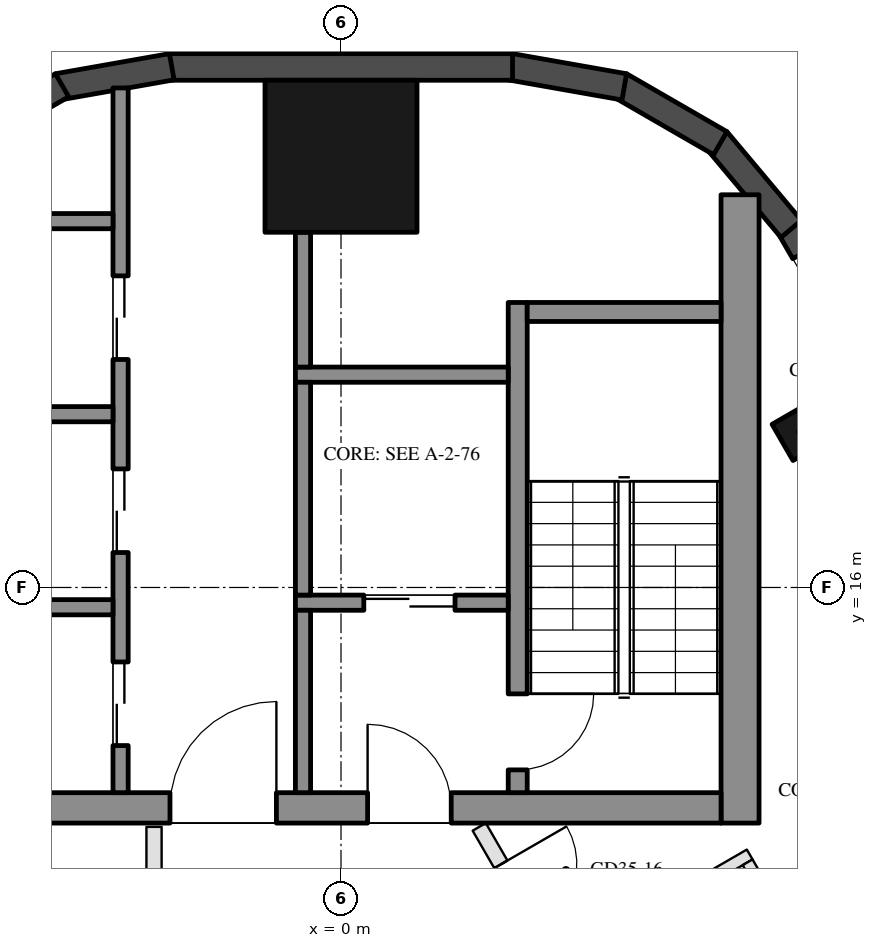
"""IFC4 building model, lengths in metres.
Left out: names, types, materials, properties, quantities, classifications, styles, units other than length and angle.
Written with IfcOpenShell. Run it as: python <this file> out.ifc"""

import sys

from ifc_helpers import new_model, si_unit, direction, frame, frame_2d, origin, origin_2d, place, context, subcontext, project, spatial, rectangle, hollow_rectangle, extrude, boolean, halfspace, element, fill, save


model = new_model("IFC4")
c1 = context("Model", 3, precision=1e-05, world=origin(), true_north=direction((0.0, 1.0)))
c2 = subcontext(c1, "Body", "Model", "MODEL_VIEW")
j1 = project(units=[si_unit("LENGTHUNIT", "METRE"), si_unit("PLANEANGLEUNIT", "RADIAN")], contexts=[c1])
p1 = place(None, origin())
s1 = spatial("IfcSite", under=j1, at=p1, CompositionType="ELEMENT")
p2 = place(p1, origin())
s2 = spatial("IfcBuilding", under=s1, at=p2, CompositionType="ELEMENT")
p3 = place(p2, frame((0.0, 0.0, 324.4)))
s3 = spatial("IfcBuildingStorey", under=s2, at=p3, CompositionType="ELEMENT", Elevation=324.4)
p4 = place(p3, frame((6.047, 18.046, 0.0), z_axis=(0.0, 0.0, 1.0), x_axis=(-0.5, 0.866025403784, 0.0)))
e1 = element("IfcColumn", 1, at=p4, inside=s3, PredefinedType="COLUMN", context=c2, shape_type="SweptSolid", body=[
    boolean("DIFFERENCE", boolean("DIFFERENCE", extrude(hollow_rectangle(XDim=0.55, YDim=0.55, WallThickness=0.025, at=origin_2d()), origin(), (0.0, 0.0, 1.0), 3.7), halfspace(frame((0.0, 0.0, 0.04), z_axis=(0.0, 0.0, 1.0), x_axis=(1.0, 0.0, 0.0)), True)), halfspace(frame((0.0, 0.0, 3.66), z_axis=(0.0, 0.0, 1.0), x_axis=(1.0, 0.0, 0.0)), False)),
])
p5 = place(p3, frame((0.0, 21.674, 0.0), z_axis=(0.0, 0.0, 1.0), x_axis=(1.0, 0.0, 0.0)))
e2 = element("IfcColumn", 2, at=p5, inside=s3, PredefinedType="COLUMN", context=c2, shape_type="SweptSolid", body=[
    boolean("DIFFERENCE", boolean("DIFFERENCE", extrude(hollow_rectangle(XDim=2.0, YDim=2.0, WallThickness=0.05, at=origin_2d()), origin(), (0.0, 0.0, 1.0), 3.7), halfspace(frame((0.0, 0.0, 0.113), z_axis=(0.0, 0.0, 1.0), x_axis=(1.0, 0.0, 0.0)), True)), halfspace(frame((0.0, 0.0, 3.587), z_axis=(0.0, 0.0, 1.0), x_axis=(1.0, 0.0, 0.0)), False)),
])
p6 = place(p3, frame((7.558, 17.879, 0.0), z_axis=(0.0, 0.0, 1.0), x_axis=(-0.499967508769, 0.866044161793, 0.0)))
e3 = element("IfcWall", 3, at=p6, inside=s3, PredefinedType="SOLIDWALL", context=c2, shape_type="SweptSolid", body=[
    extrude(rectangle(XDim=3.306, YDim=0.35, at=frame_2d((1.653, 0.0))), origin(), (0.0, 0.0, 1.0), 3.55),
])
p7 = place(p6, frame((1.525, 0.0, 0.3)))
e4 = element("IfcOpeningElement", 4, at=p7, cuts=e3, PredefinedType="OPENING", context=c2, shape_type="SweptSolid", body=[
    extrude(rectangle(XDim=1.4, YDim=2.65, at=frame_2d((0.7, 1.325))), frame((0.0, 0.185, 0.0), z_axis=(0.0, -1.0, 0.0), x_axis=(1.0, 0.0, 0.0)), (0.0, 0.0, 1.0), 0.37),
])
for number, where, z_axis, x_axis in (
    (5, (5.923, 20.718, 0.0), (0.0, 0.0, 1.0), (-0.643, 0.766, 0.0)),
    (6, (4.99, 21.846, 0.0), (0.0, 0.0, 1.0), (-0.866, 0.5, 0.0)),
):
    element("IfcWall", number, at=place(p3, frame(where, z_axis=z_axis, x_axis=x_axis)), inside=s3, PredefinedType="SOLIDWALL", context=c2, shape_type="SweptSolid", body=[
        extrude(rectangle(XDim=1.524, YDim=0.35, at=frame_2d((0.762, 0.0))), origin(), (0.0, 0.0, 1.0), 3.55),
    ])
p8 = place(p3, frame((3.727, 22.587, 0.0), z_axis=(0.0, 0.0, 1.0), x_axis=(-0.984804518596, 0.173666519954, 0.0)))
e7 = element("IfcWall", 7, at=p8, inside=s3, PredefinedType="SOLIDWALL", context=c2, shape_type="SweptSolid", body=[
    extrude(rectangle(XDim=1.524, YDim=0.35, at=frame_2d((0.762, 0.0))), origin(), (0.0, 0.0, 1.0), 3.55),
])
p9 = place(p3, frame((2.257, 22.849, 0.0), z_axis=(0.0, 0.0, 1.0), x_axis=(-1.0, 0.0, 0.0)))
e8 = element("IfcWall", 8, at=p9, inside=s3, PredefinedType="SOLIDWALL", context=c2, shape_type="SweptSolid", body=[
    extrude(rectangle(XDim=4.514, YDim=0.35, at=frame_2d((2.257, 0.0))), origin(), (0.0, 0.0, 1.0), 3.55),
])
p10 = place(p3, frame((-2.227, 22.852, 0.0), z_axis=(0.0, 0.0, 1.0), x_axis=(-0.984804518596, -0.173666519954, 0.0)))
e9 = element("IfcWall", 9, at=p10, inside=s3, PredefinedType="SOLIDWALL", context=c2, shape_type="SweptSolid", body=[
    extrude(rectangle(XDim=1.524, YDim=0.35, at=frame_2d((0.762, 0.0))), origin(), (0.0, 0.0, 1.0), 3.55),
])
p11 = place(p3, frame((-3.67, 22.608, 0.0), z_axis=(0.0, 0.0, 1.0), x_axis=(-0.865996139065, -0.500050684555, 0.0)))
e10 = element("IfcWall", 10, at=p11, inside=s3, PredefinedType="SOLIDWALL", context=c2, shape_type="SweptSolid", body=[
    extrude(rectangle(XDim=1.524, YDim=0.35, at=frame_2d((0.762, 0.0))), origin(), (0.0, 0.0, 1.0), 3.55),
])
p12 = place(p3, frame((5.25, 12.9, 0.0), z_axis=(0.0, 0.0, 1.0), x_axis=(0.0, 1.0, 0.0)))
e11 = element("IfcWall", 11, at=p12, inside=s3, PredefinedType="SHEAR", context=c2, shape_type="SweptSolid", body=[
    extrude(rectangle(XDim=8.267, YDim=0.5, at=frame_2d((4.134, 0.0))), origin(), (0.0, 0.0, 1.0), 3.5),
])
p13 = place(p3, frame((5.0, 13.1, 0.0), z_axis=(0.0, 0.0, 1.0), x_axis=(-1.0, 0.0, 0.0)))
e12 = element("IfcWall", 12, at=p13, inside=s3, PredefinedType="SHEAR", context=c2, shape_type="SweptSolid", body=[
    extrude(rectangle(XDim=10.0, YDim=0.4, at=frame_2d((5.0, 0.0))), origin(), (0.0, 0.0, 1.0), 3.5),
])
p14 = place(p13, frame((3.55, 0.0, 0.0)))
e13 = element("IfcOpeningElement", 13, at=p14, cuts=e12, PredefinedType="OPENING", context=c2, shape_type="SweptSolid", body=[
    extrude(rectangle(XDim=1.1, YDim=2.1, at=frame_2d((0.55, 1.05))), frame((0.0, 0.21, 0.0), z_axis=(0.0, -1.0, 0.0), x_axis=(1.0, 0.0, 0.0)), (0.0, 0.0, 1.0), 0.42),
])
p15 = place(p13, frame((5.85, 0.0, 0.0)))
e14 = element("IfcOpeningElement", 14, at=p15, cuts=e12, PredefinedType="OPENING", context=c2, shape_type="SweptSolid", body=[
    extrude(rectangle(XDim=1.4, YDim=2.1, at=frame_2d((0.7, 1.05))), frame((0.0, 0.21, 0.0), z_axis=(0.0, -1.0, 0.0), x_axis=(1.0, 0.0, 0.0)), (0.0, 0.0, 1.0), 0.42),
])
p16 = place(p3, frame((2.325, 13.3, 0.0), z_axis=(0.0, 0.0, 1.0), x_axis=(0.0, 1.0, 0.0)))
e15 = element("IfcWall", 15, at=p16, inside=s3, PredefinedType="SHEAR", context=c2, shape_type="SweptSolid", body=[
    extrude(rectangle(XDim=6.45, YDim=0.25, at=frame_2d((3.225, 0.0))), origin(), (0.0, 0.0, 1.0), 3.5),
])
p17 = place(p16, frame((0.3, 0.0, 0.0)))
e16 = element("IfcOpeningElement", 16, at=p17, cuts=e15, PredefinedType="OPENING", context=c2, shape_type="SweptSolid", body=[
    extrude(rectangle(XDim=1.0, YDim=2.1, at=frame_2d((0.5, 1.05))), frame((0.0, 0.135, 0.0), z_axis=(0.0, -1.0, 0.0), x_axis=(1.0, 0.0, 0.0)), (0.0, 0.0, 1.0), 0.27),
])
p18 = place(p3, frame((5.0, 19.625, 0.0), z_axis=(0.0, 0.0, 1.0), x_axis=(-1.0, 0.0, 0.0)))
e17 = element("IfcWall", 17, at=p18, inside=s3, PredefinedType="SHEAR", context=c2, shape_type="SweptSolid", body=[
    extrude(rectangle(XDim=2.55, YDim=0.25, at=frame_2d((1.275, 0.0))), origin(), (0.0, 0.0, 1.0), 3.5),
])
p19 = place(p3, frame((2.2, 18.8, 0.0), z_axis=(0.0, 0.0, 1.0), x_axis=(-1.0, 0.0, 0.0)))
e18 = element("IfcWall", 18, at=p19, inside=s3, PredefinedType="SHEAR", context=c2, shape_type="SweptSolid", body=[
    extrude(rectangle(XDim=2.8, YDim=0.2, at=frame_2d((1.4, 0.0))), origin(), (0.0, 0.0, 1.0), 3.5),
])
p20 = place(p3, frame((2.2, 15.8, 0.0), z_axis=(0.0, 0.0, 1.0), x_axis=(-1.0, 0.0, 0.0)))
e19 = element("IfcWall", 19, at=p20, inside=s3, PredefinedType="SHEAR", context=c2, shape_type="SweptSolid", body=[
    extrude(rectangle(XDim=2.8, YDim=0.2, at=frame_2d((1.4, 0.0))), origin(), (0.0, 0.0, 1.0), 3.5),
])
p21 = place(p20, frame((0.7, 0.0, 0.0)))
e20 = element("IfcOpeningElement", 20, at=p21, cuts=e19, PredefinedType="OPENING", context=c2, shape_type="SweptSolid", body=[
    extrude(rectangle(XDim=1.2, YDim=2.1, at=frame_2d((0.6, 1.05))), frame((0.0, 0.11, 0.0), z_axis=(0.0, -1.0, 0.0), x_axis=(1.0, 0.0, 0.0)), (0.0, 0.0, 1.0), 0.22),
])
p22 = place(p3, frame((-0.5, 15.9, 0.0), z_axis=(0.0, 0.0, 1.0), x_axis=(0.0, 1.0, 0.0)))
e21 = element("IfcWall", 21, at=p22, inside=s3, PredefinedType="SHEAR", context=c2, shape_type="SweptSolid", body=[
    extrude(rectangle(XDim=2.8, YDim=0.2, at=frame_2d((1.4, 0.0))), origin(), (0.0, 0.0, 1.0), 3.5),
])
p23 = place(p3, frame((-0.5, 13.3, 0.0), z_axis=(0.0, 0.0, 1.0), x_axis=(0.0, 1.0, 0.0)))
e22 = element("IfcWall", 22, at=p23, inside=s3, PredefinedType="SHEAR", context=c2, shape_type="SweptSolid", body=[
    extrude(rectangle(XDim=2.4, YDim=0.2, at=frame_2d((1.2, 0.0))), origin(), (0.0, 0.0, 1.0), 3.5),
])
p24 = place(p3, frame((-2.9, 13.3, 0.0), z_axis=(0.0, 0.0, 1.0), x_axis=(0.0, 1.0, 0.0)))
e23 = element("IfcWall", 23, at=p24, inside=s3, PredefinedType="SHEAR", context=c2, shape_type="SweptSolid", body=[
    extrude(rectangle(XDim=9.273, YDim=0.2, at=frame_2d((4.636, 0.0))), origin(), (0.0, 0.0, 1.0), 3.5),
])
p25 = place(p24, frame((0.62, 0.0, 0.0)))
e24 = element("IfcOpeningElement", 24, at=p25, cuts=e23, PredefinedType="OPENING", context=c2, shape_type="SweptSolid", body=[
    extrude(rectangle(XDim=1.1, YDim=2.1, at=frame_2d((0.55, 1.05))), frame((0.0, 0.11, 0.0), z_axis=(0.0, -1.0, 0.0), x_axis=(1.0, 0.0, 0.0)), (0.0, 0.0, 1.0), 0.22),
])
p26 = place(p24, frame((3.16, 0.0, 0.0)))
e25 = element("IfcOpeningElement", 25, at=p26, cuts=e23, PredefinedType="OPENING", context=c2, shape_type="SweptSolid", body=[
    extrude(rectangle(XDim=1.1, YDim=2.1, at=frame_2d((0.55, 1.05))), frame((0.0, 0.11, 0.0), z_axis=(0.0, -1.0, 0.0), x_axis=(1.0, 0.0, 0.0)), (0.0, 0.0, 1.0), 0.22),
])
p27 = place(p24, frame((5.7, 0.0, 0.0)))
e26 = element("IfcOpeningElement", 26, at=p27, cuts=e23, PredefinedType="OPENING", context=c2, shape_type="SweptSolid", body=[
    extrude(rectangle(XDim=1.1, YDim=2.1, at=frame_2d((0.55, 1.05))), frame((0.0, 0.11, 0.0), z_axis=(0.0, -1.0, 0.0), x_axis=(1.0, 0.0, 0.0)), (0.0, 0.0, 1.0), 0.22),
])
p28 = place(p3, frame((-0.5, 18.9, 0.0), z_axis=(0.0, 0.0, 1.0), x_axis=(0.0, 1.0, 0.0)))
e27 = element("IfcWall", 27, at=p28, inside=s3, PredefinedType="SHEAR", context=c2, shape_type="SweptSolid", body=[
    extrude(rectangle(XDim=1.774, YDim=0.2, at=frame_2d((0.887, 0.0))), origin(), (0.0, 0.0, 1.0), 3.5),
])
for number, where, z_axis, x_axis in (
    (28, (-3.0, 15.74, 0.0), (0.0, 0.0, 1.0), (-1.0, 0.0, 0.0)),
    (29, (-3.0, 18.28, 0.0), (0.0, 0.0, 1.0), (-1.0, 0.0, 0.0)),
    (30, (-3.0, 20.82, 0.0), (0.0, 0.0, 1.0), (-1.0, 0.0, 0.0)),
):
    element("IfcWall", number, at=place(p3, frame(where, z_axis=z_axis, x_axis=x_axis)), inside=s3, PredefinedType="SHEAR", context=c2, shape_type="SweptSolid", body=[
        extrude(rectangle(XDim=2.0, YDim=0.2, at=frame_2d((1.0, 0.0))), origin(), (0.0, 0.0, 1.0), 3.5),
    ])
p29 = place(p3, frame((8.979, 12.418, 0.0), z_axis=(0.0, 0.0, 1.0), x_axis=(-0.851645923852, -0.524117563516, 0.0)))
e31 = element("IfcWall", 31, at=p29, inside=s3, PredefinedType="PARTITIONING", context=c2, shape_type="SweptSolid", body=[
    extrude(rectangle(XDim=6.088, YDim=0.2, at=frame_2d((3.044, 0.0))), origin(), (0.0, 0.0, 1.0), 3.15),
])
p30 = place(p3, frame((1.819, 12.85, 0.0), z_axis=(0.0, 0.0, 1.0), x_axis=(0.499997437312, -0.866026883348, 0.0)))
e32 = element("IfcWall", 32, at=p30, inside=s3, PredefinedType="PARTITIONING", context=c2, shape_type="SweptSolid", body=[
    extrude(rectangle(XDim=4.022, YDim=0.2, at=frame_2d((2.011, 0.0))), origin(), (0.0, 0.0, 1.0), 3.15),
])
p31 = place(p30, frame((0.569, 0.0, 0.0)))
e33 = element("IfcOpeningElement", 33, at=p31, cuts=e32, PredefinedType="OPENING", context=c2, shape_type="SweptSolid", body=[
    extrude(rectangle(XDim=1.0, YDim=2.1, at=frame_2d((0.5, 1.05))), frame((0.0, 0.11, 0.0), z_axis=(0.0, -1.0, 0.0), x_axis=(1.0, 0.0, 0.0)), (0.0, 0.0, 1.0), 0.22),
])
p32 = place(p3, frame((5.377, 12.487, 0.0), z_axis=(0.0, 0.0, 1.0), x_axis=(-0.865996816683, -0.500049511043, 0.0)))
e34 = element("IfcWall", 34, at=p32, inside=s3, PredefinedType="PARTITIONING", context=c2, shape_type="SweptSolid", body=[
    extrude(rectangle(XDim=2.8, YDim=0.15, at=frame_2d((1.4, 0.0))), origin(), (0.0, 0.0, 1.0), 3.55),
])
p33 = place(p32, frame((0.5, 0.0, 0.0)))
e35 = element("IfcOpeningElement", 35, at=p33, cuts=e34, PredefinedType="OPENING", context=c2, shape_type="SweptSolid", body=[
    extrude(rectangle(XDim=0.9, YDim=2.1, at=frame_2d((0.45, 1.05))), frame((0.0, 0.085, 0.0), z_axis=(0.0, -1.0, 0.0), x_axis=(1.0, 0.0, 0.0)), (0.0, 0.0, 1.0), 0.17),
])
p34 = place(p3, frame((6.237, 10.848, 0.0), z_axis=(0.0, 0.0, 1.0), x_axis=(-0.500091824179, 0.865972382579, 0.0)))
e36 = element("IfcWall", 36, at=p34, inside=s3, PredefinedType="PARTITIONING", context=c2, shape_type="SweptSolid", body=[
    extrude(rectangle(XDim=1.774, YDim=0.15, at=frame_2d((0.887, 0.0))), origin(), (0.0, 0.0, 1.0), 3.15),
])
p35 = place(p3, frame((-2.46, 11.739, 0.0), z_axis=(0.0, 0.0, 1.0), x_axis=(0.0, 1.0, 0.0)))
e37 = element("IfcWall", 37, at=p35, inside=s3, PredefinedType="PARTITIONING", context=c2, shape_type="SweptSolid", body=[
    extrude(rectangle(XDim=1.111, YDim=0.2, at=frame_2d((0.555, 0.0))), origin(), (0.0, 0.0, 1.0), 3.55),
])
p36 = place(p21, origin())
e38 = element("IfcDoor", 38, at=p36, inside=s3, OperationType="DOUBLE_DOOR_SLIDING", PredefinedType="DOOR", context=c2, shape_type="SweptSolid", body=[
    extrude(rectangle(XDim=1.2, YDim=2.1, at=frame_2d((0.6, 1.05))), frame((0.0, 0.025, 0.0), z_axis=(0.0, -1.0, 0.0), x_axis=(1.0, 0.0, 0.0)), (0.0, 0.0, 1.0), 0.05),
])
fill(e20, e38)
p37 = place(p25, origin())
e39 = element("IfcDoor", 39, at=p37, inside=s3, OperationType="DOUBLE_DOOR_SLIDING", PredefinedType="DOOR", context=c2, shape_type="SweptSolid", body=[
    extrude(rectangle(XDim=1.1, YDim=2.1, at=frame_2d((0.55, 1.05))), frame((0.0, 0.025, 0.0), z_axis=(0.0, -1.0, 0.0), x_axis=(1.0, 0.0, 0.0)), (0.0, 0.0, 1.0), 0.05),
])
fill(e24, e39)
p38 = place(p26, origin())
e40 = element("IfcDoor", 40, at=p38, inside=s3, OperationType="DOUBLE_DOOR_SLIDING", PredefinedType="DOOR", context=c2, shape_type="SweptSolid", body=[
    extrude(rectangle(XDim=1.1, YDim=2.1, at=frame_2d((0.55, 1.05))), frame((0.0, 0.025, 0.0), z_axis=(0.0, -1.0, 0.0), x_axis=(1.0, 0.0, 0.0)), (0.0, 0.0, 1.0), 0.05),
])
fill(e25, e40)
p39 = place(p27, origin())
e41 = element("IfcDoor", 41, at=p39, inside=s3, OperationType="DOUBLE_DOOR_SLIDING", PredefinedType="DOOR", context=c2, shape_type="SweptSolid", body=[
    extrude(rectangle(XDim=1.1, YDim=2.1, at=frame_2d((0.55, 1.05))), frame((0.0, 0.025, 0.0), z_axis=(0.0, -1.0, 0.0), x_axis=(1.0, 0.0, 0.0)), (0.0, 0.0, 1.0), 0.05),
])
fill(e26, e41)
p40 = place(p14, frame((1.1, 0.0, 0.0), z_axis=(0.0, 0.0, 1.0), x_axis=(-1.0, 0.0, 0.0)))
e42 = element("IfcDoor", 42, at=p40, inside=s3, OperationType="SINGLE_SWING_LEFT", PredefinedType="DOOR", context=c2, shape_type="SweptSolid", body=[
    extrude(rectangle(XDim=1.1, YDim=2.1, at=frame_2d((0.55, 1.05))), frame((0.0, 0.025, 0.0), z_axis=(0.0, -1.0, 0.0), x_axis=(1.0, 0.0, 0.0)), (0.0, 0.0, 1.0), 0.05),
])
fill(e13, e42)
p41 = place(p15, frame((1.4, 0.0, 0.0), z_axis=(0.0, 0.0, 1.0), x_axis=(-1.0, 0.0, 0.0)))
e43 = element("IfcDoor", 43, at=p41, inside=s3, OperationType="DOUBLE_DOOR_SINGLE_SWING", PredefinedType="DOOR", context=c2, shape_type="SweptSolid", body=[
    extrude(rectangle(XDim=1.4, YDim=2.1, at=frame_2d((0.7, 1.05))), frame((0.0, 0.025, 0.0), z_axis=(0.0, -1.0, 0.0), x_axis=(1.0, 0.0, 0.0)), (0.0, 0.0, 1.0), 0.05),
])
fill(e14, e43)
p42 = place(p17, frame((1.0, 0.0, 0.0), z_axis=(0.0, 0.0, 1.0), x_axis=(-1.0, 0.0, 0.0)))
e44 = element("IfcDoor", 44, at=p42, inside=s3, OperationType="SINGLE_SWING_LEFT", PredefinedType="DOOR", context=c2, shape_type="SweptSolid", body=[
    extrude(rectangle(XDim=1.0, YDim=2.1, at=frame_2d((0.5, 1.05))), frame((0.0, 0.025, 0.0), z_axis=(0.0, -1.0, 0.0), x_axis=(1.0, 0.0, 0.0)), (0.0, 0.0, 1.0), 0.05),
])
fill(e16, e44)
p43 = place(p31, origin())
e45 = element("IfcDoor", 45, at=p43, inside=s3, OperationType="SINGLE_SWING_LEFT", PredefinedType="DOOR", context=c2, shape_type="SweptSolid", body=[
    extrude(rectangle(XDim=1.0, YDim=2.1, at=frame_2d((0.5, 1.05))), frame((0.0, 0.025, 0.0), z_axis=(0.0, -1.0, 0.0), x_axis=(1.0, 0.0, 0.0)), (0.0, 0.0, 1.0), 0.05),
])
fill(e33, e45)
save(model, sys.argv[1])
